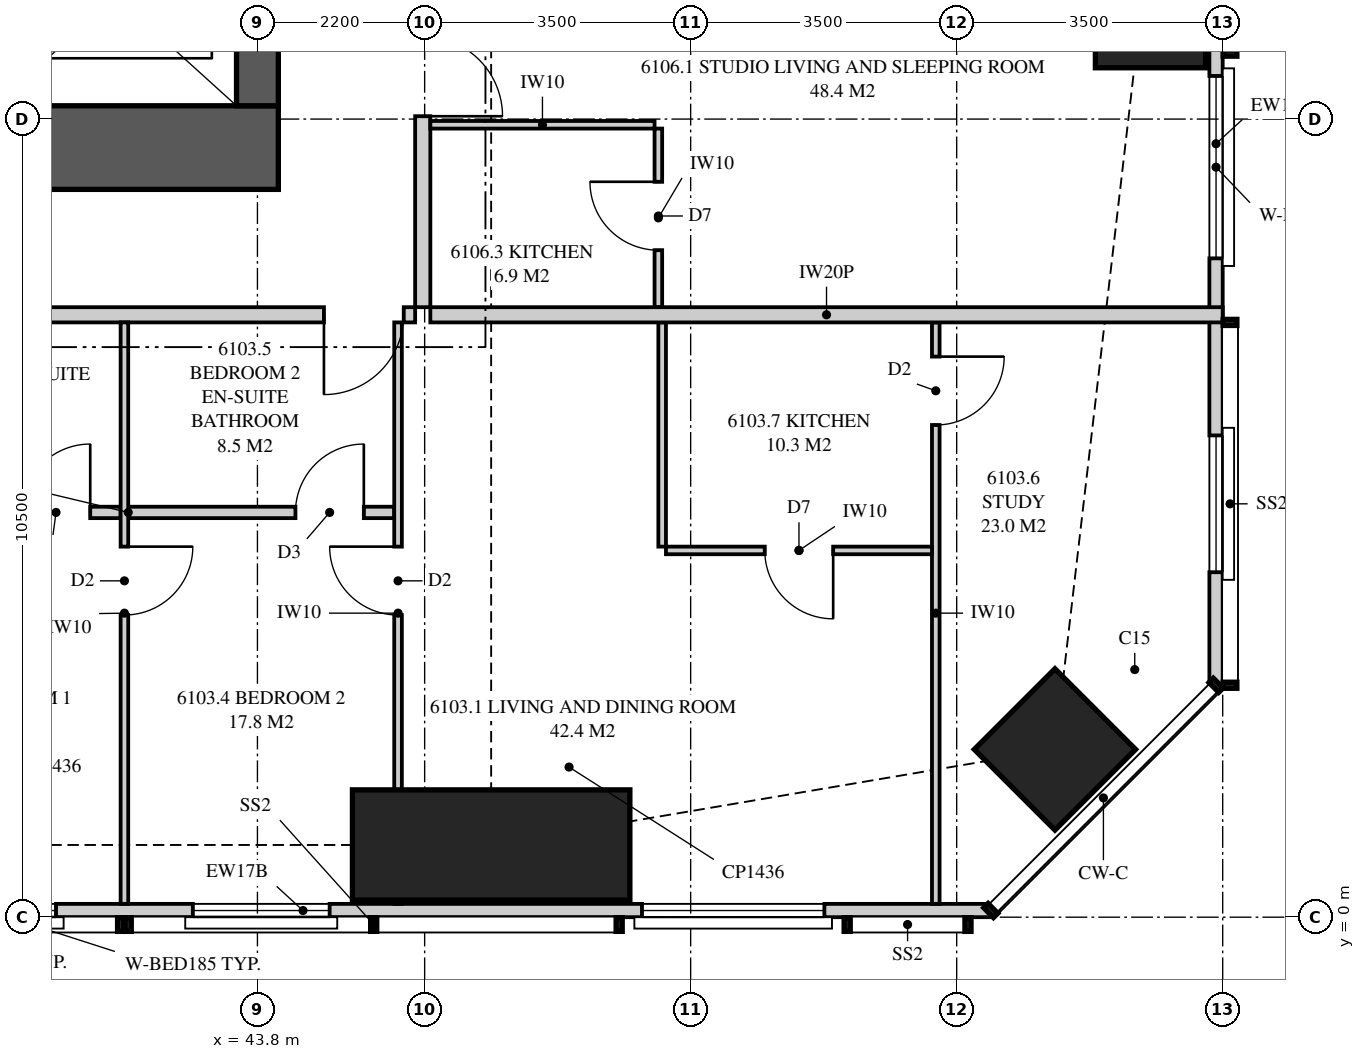
"""IFC4 building model, lengths in metres.
Left out: names, types, materials, properties, quantities, classifications, styles, units other than length and angle.
Written with IfcOpenShell. Run it as: python <this file> out.ifc"""

import sys

from ifc_helpers import new_model, si_unit, direction, frame, frame_2d, origin, origin_2d, place, context, subcontext, project, spatial, polyline, rectangle, outline, extrude, element, fill, save


model = new_model("IFC4")
c1 = context("Model", 3, precision=1e-05, world=origin(), true_north=direction((0.0, 1.0)))
c2 = subcontext(c1, "Body", "Model", "MODEL_VIEW")
j1 = project(units=[si_unit("LENGTHUNIT", "METRE"), si_unit("PLANEANGLEUNIT", "RADIAN")], contexts=[c1])
p1 = place(None, origin())
s1 = spatial("IfcSite", under=j1, at=p1, CompositionType="ELEMENT")
p2 = place(p1, origin())
s2 = spatial("IfcBuilding", under=s1, at=p2, CompositionType="ELEMENT")
p3 = place(p2, frame((0.0, 0.0, 224.95)))
s3 = spatial("IfcBuildingStorey", under=s2, at=p3, CompositionType="ELEMENT", Elevation=224.95)
p4 = place(p3, frame((46.875, 0.95, 0.0), z_axis=(0.0, 0.0, 1.0), x_axis=(0.0, 1.0, 0.0)))
e1 = element("IfcColumn", 1, at=p4, inside=s3, PredefinedType="COLUMN", context=c2, shape_type="SweptSolid", body=[
    extrude(rectangle(XDim=1.45, YDim=3.65, at=origin_2d()), origin(), (0.0, 0.0, 1.0), 3.5),
])
p5 = place(p3, frame((54.293, 2.207, 0.0), z_axis=(0.0, 0.0, 1.0), x_axis=(0.707106781187, 0.707106781187, 0.0)))
e2 = element("IfcColumn", 2, at=p5, inside=s3, PredefinedType="COLUMN", context=c2, shape_type="SweptSolid", body=[
    extrude(rectangle(XDim=1.5, YDim=1.5, at=origin_2d()), origin(), (0.0, 0.0, 1.0), 3.5),
])
p6 = place(p3, frame((55.55, 13.0, 0.0), z_axis=(0.0, 0.0, 1.0), x_axis=(1.0, 0.0, 0.0)))
e3 = element("IfcColumn", 3, at=p6, inside=s3, PredefinedType="COLUMN", context=c2, shape_type="SweptSolid", body=[
    extrude(rectangle(XDim=1.45, YDim=3.65, at=origin_2d()), origin(), (0.0, 0.0, 1.0), 3.5),
])
p7 = place(p3, frame((35.9, 10.125, 0.0), z_axis=(0.0, 0.0, 1.0), x_axis=(1.0, 0.0, 0.0)))
e4 = element("IfcWall", 4, at=p7, inside=s3, PredefinedType="SHEAR", context=c2, shape_type="SweptSolid", body=[
    extrude(rectangle(XDim=8.175, YDim=1.1, at=frame_2d((4.087, 0.0))), origin(), (0.0, 0.0, 1.0), 3.5),
])
p8 = place(p7, frame((2.7, 0.0, 0.0)))
e5 = element("IfcOpeningElement", 5, at=p8, cuts=e4, PredefinedType="OPENING", context=c2, shape_type="SweptSolid", body=[
    extrude(rectangle(XDim=1.0, YDim=2.1, at=frame_2d((0.5, 1.05))), frame((0.0, 0.56, 0.0), z_axis=(0.0, -1.0, 0.0), x_axis=(1.0, 0.0, 0.0)), (0.0, 0.0, 1.0), 1.12),
])
p9 = place(p3, frame((43.8, 10.675, 0.0), z_axis=(0.0, 0.0, 1.0), x_axis=(0.0, 1.0, 0.0)))
e6 = element("IfcWall", 6, at=p9, inside=s3, PredefinedType="SHEAR", context=c2, shape_type="SweptSolid", body=[
    extrude(rectangle(XDim=2.325, YDim=0.55, at=frame_2d((1.163, 0.0))), origin(), (0.0, 0.0, 1.0), 3.5),
])
p10 = place(p3, frame((35.35, 0.087, 0.0), z_axis=(0.0, 0.0, 1.0), x_axis=(1.0, 0.0, 0.0)))
e7 = element("IfcWall", 7, at=p10, inside=s3, PredefinedType="SOLIDWALL", context=c2, shape_type="SweptSolid", body=[
    extrude(outline(polyline([(0.0, 0.0), (18.099, 0.0), (18.099, 3.26), (11.74, 3.26), (11.74, 2.3), (11.656, 2.3), (11.656, 3.26), (11.525, 3.26), (11.525, 2.3), (0.0, 2.3), (0.0, 0.0)])), frame((0.0, 0.087, 0.0), z_axis=(0.0, -1.0, 0.0), x_axis=(1.0, 0.0, 0.0)), (0.0, 0.0, 1.0), 0.175),
])
p11 = place(p10, frame((4.0, 0.0, 0.4)))
e8 = element("IfcOpeningElement", 8, at=p11, cuts=e7, PredefinedType="OPENING", context=c2, shape_type="SweptSolid", body=[
    extrude(rectangle(XDim=1.8, YDim=1.85, at=frame_2d((0.9, 0.925))), frame((0.0, 0.097, 0.0), z_axis=(0.0, -1.0, 0.0), x_axis=(1.0, 0.0, 0.0)), (0.0, 0.0, 1.0), 0.195),
])
p12 = place(p10, frame((7.6, 0.0, 0.4)))
e9 = element("IfcOpeningElement", 9, at=p12, cuts=e7, PredefinedType="OPENING", context=c2, shape_type="SweptSolid", body=[
    extrude(rectangle(XDim=1.8, YDim=1.85, at=frame_2d((0.9, 0.925))), frame((0.0, 0.097, 0.0), z_axis=(0.0, -1.0, 0.0), x_axis=(1.0, 0.0, 0.0)), (0.0, 0.0, 1.0), 0.195),
])
p13 = place(p10, frame((13.51, 0.0, 0.4)))
e10 = element("IfcOpeningElement", 10, at=p13, cuts=e7, PredefinedType="OPENING", context=c2, shape_type="SweptSolid", body=[
    extrude(rectangle(XDim=2.4, YDim=1.85, at=frame_2d((1.2, 0.925))), frame((0.0, 0.097, 0.0), z_axis=(0.0, -1.0, 0.0), x_axis=(1.0, 0.0, 0.0)), (0.0, 0.0, 1.0), 0.195),
])
p14 = place(p3, frame((56.413, 3.051, 0.0), z_axis=(0.0, 0.0, 1.0), x_axis=(0.0, 1.0, 0.0)))
e11 = element("IfcWall", 11, at=p14, inside=s3, PredefinedType="SOLIDWALL", context=c2, shape_type="SweptSolid", body=[
    extrude(outline(polyline([(0.0, 0.0), (14.249, 0.0), (14.249, 2.3), (9.949, 2.3), (9.949, 3.26), (9.858, 3.26), (9.858, 2.3), (9.688, 2.3), (9.688, 3.26), (0.0, 3.26), (0.0, 0.0)])), frame((0.0, 0.087, 0.0), z_axis=(0.0, -1.0, 0.0), x_axis=(1.0, 0.0, 0.0)), (0.0, 0.0, 1.0), 0.175),
])
p15 = place(p14, frame((1.487, 0.0, 0.4)))
e12 = element("IfcOpeningElement", 12, at=p15, cuts=e11, PredefinedType="OPENING", context=c2, shape_type="SweptSolid", body=[
    extrude(rectangle(XDim=1.8, YDim=1.85, at=frame_2d((0.9, 0.925))), frame((0.0, 0.097, 0.0), z_axis=(0.0, -1.0, 0.0), x_axis=(1.0, 0.0, 0.0)), (0.0, 0.0, 1.0), 0.195),
])
p16 = place(p14, frame((5.616, 0.0, 0.4)))
e13 = element("IfcOpeningElement", 13, at=p16, cuts=e11, PredefinedType="OPENING", context=c2, shape_type="SweptSolid", body=[
    extrude(rectangle(XDim=2.4, YDim=1.85, at=frame_2d((1.2, 0.925))), frame((0.0, 0.097, 0.0), z_axis=(0.0, -1.0, 0.0), x_axis=(1.0, 0.0, 0.0)), (0.0, 0.0, 1.0), 0.195),
])
p17 = place(p14, frame((11.875, 0.0, 0.4)))
e14 = element("IfcOpeningElement", 14, at=p17, cuts=e11, PredefinedType="OPENING", context=c2, shape_type="SweptSolid", body=[
    extrude(rectangle(XDim=1.8, YDim=1.85, at=frame_2d((0.9, 0.925))), frame((0.0, 0.097, 0.0), z_axis=(0.0, -1.0, 0.0), x_axis=(1.0, 0.0, 0.0)), (0.0, 0.0, 1.0), 0.195),
])
p18 = place(p3, frame((38.55, 7.925, 0.0), z_axis=(0.0, 0.0, 1.0), x_axis=(1.0, 0.0, 0.0)))
e15 = element("IfcWall", 15, at=p18, inside=s3, PredefinedType="PARTITIONING", context=c2, shape_type="SweptSolid", body=[
    extrude(outline(polyline([(0.0, 0.0), (7.325, 0.0), (7.325, 3.26), (7.325, 2.66), (7.015, 2.66), (7.015, 3.26), (0.01, 3.26), (0.01, 2.66), (0.0, 2.66), (0.0, 3.26), (0.0, 0.0)])), frame((0.0, 0.1, 0.0), z_axis=(0.0, -1.0, 0.0), x_axis=(1.0, 0.0, 0.0)), (0.0, 0.0, 1.0), 0.2),
])
p19 = place(p18, frame((6.125, 0.0, 0.0)))
e16 = element("IfcOpeningElement", 16, at=p19, cuts=e15, PredefinedType="OPENING", context=c2, shape_type="SweptSolid", body=[
    extrude(rectangle(XDim=1.05, YDim=2.2, at=frame_2d((0.525, 1.1))), frame((0.0, 0.11, 0.0), z_axis=(0.0, -1.0, 0.0), x_axis=(1.0, 0.0, 0.0)), (0.0, 0.0, 1.0), 0.22),
])
p20 = place(p3, frame((42.05, 0.175, 0.0), z_axis=(0.0, 0.0, 1.0), x_axis=(0.0, 1.0, 0.0)))
e17 = element("IfcWall", 17, at=p20, inside=s3, PredefinedType="PARTITIONING", context=c2, shape_type="SweptSolid", body=[
    extrude(outline(polyline([(0.0, 0.0), (7.65, 0.0), (7.65, 3.26), (1.635, 3.26), (1.635, 2.3), (0.0, 2.3), (0.0, 3.26), (0.0, 0.0)])), frame((0.0, 0.05, 0.0), z_axis=(0.0, -1.0, 0.0), x_axis=(1.0, 0.0, 0.0)), (0.0, 0.0, 1.0), 0.1),
])
p21 = place(p20, frame((3.8, 0.0, 0.0)))
e18 = element("IfcOpeningElement", 18, at=p21, cuts=e17, PredefinedType="OPENING", context=c2, shape_type="SweptSolid", body=[
    extrude(rectangle(XDim=0.9, YDim=2.1, at=frame_2d((0.45, 1.05))), frame((0.0, 0.06, 0.0), z_axis=(0.0, -1.0, 0.0), x_axis=(1.0, 0.0, 0.0)), (0.0, 0.0, 1.0), 0.12),
])
p22 = place(p3, frame((45.65, 0.175, 0.0), z_axis=(0.0, 0.0, 1.0), x_axis=(0.0, 1.0, 0.0)))
e19 = element("IfcWall", 19, at=p22, inside=s3, PredefinedType="PARTITIONING", context=c2, shape_type="SweptSolid", body=[
    extrude(outline(polyline([(0.529, 2.3), (0.0, 2.3), (0.0, 0.0), (0.529, 0.0), (0.529, 0.252), (1.021, 0.252), (1.021, 0.0), (7.65, 0.0), (7.65, 2.66), (1.635, 2.66), (1.635, 2.3), (1.021, 2.3), (1.021, 2.048), (0.529, 2.048), (0.529, 2.3)])), frame((0.0, 0.05, 0.0), z_axis=(0.0, -1.0, 0.0), x_axis=(1.0, 0.0, 0.0)), (0.0, 0.0, 1.0), 0.1),
])
p23 = place(p22, frame((3.8, 0.0, 0.0)))
e20 = element("IfcOpeningElement", 20, at=p23, cuts=e19, PredefinedType="OPENING", context=c2, shape_type="SweptSolid", body=[
    extrude(rectangle(XDim=0.9, YDim=2.1, at=frame_2d((0.45, 1.05))), frame((0.0, 0.06, 0.0), z_axis=(0.0, -1.0, 0.0), x_axis=(1.0, 0.0, 0.0)), (0.0, 0.0, 1.0), 0.12),
])
p24 = place(p3, frame((38.55, 5.325, 0.0), z_axis=(0.0, 0.0, 1.0), x_axis=(1.0, 0.0, 0.0)))
e21 = element("IfcWall", 21, at=p24, inside=s3, PredefinedType="PLUMBINGWALL", context=c2, shape_type="SweptSolid", body=[
    extrude(rectangle(XDim=3.45, YDim=0.15, at=frame_2d((1.725, 0.0))), origin(), (0.0, 0.0, 1.0), 3.26),
])
p25 = place(p24, frame((2.15, 0.0, 0.0)))
e22 = element("IfcOpeningElement", 22, at=p25, cuts=e21, PredefinedType="OPENING", context=c2, shape_type="SweptSolid", body=[
    extrude(rectangle(XDim=0.9, YDim=2.1, at=frame_2d((0.45, 1.05))), frame((0.0, 0.085, 0.0), z_axis=(0.0, -1.0, 0.0), x_axis=(1.0, 0.0, 0.0)), (0.0, 0.0, 1.0), 0.17),
])
p26 = place(p3, frame((42.1, 5.325, 0.0), z_axis=(0.0, 0.0, 1.0), x_axis=(1.0, 0.0, 0.0)))
e23 = element("IfcWall", 23, at=p26, inside=s3, PredefinedType="PLUMBINGWALL", context=c2, shape_type="SweptSolid", body=[
    extrude(outline(polyline([(0.0, 0.0), (3.5, 0.0), (3.5, 3.26), (3.5, 2.66), (3.49, 2.66), (3.49, 3.26), (0.0, 3.26), (0.0, 0.0)])), frame((0.0, 0.075, 0.0), z_axis=(0.0, -1.0, 0.0), x_axis=(1.0, 0.0, 0.0)), (0.0, 0.0, 1.0), 0.15),
])
p27 = place(p26, frame((2.2, 0.0, 0.0)))
e24 = element("IfcOpeningElement", 24, at=p27, cuts=e23, PredefinedType="OPENING", context=c2, shape_type="SweptSolid", body=[
    extrude(rectangle(XDim=0.9, YDim=2.1, at=frame_2d((0.45, 1.05))), frame((0.0, 0.085, 0.0), z_axis=(0.0, -1.0, 0.0), x_axis=(1.0, 0.0, 0.0)), (0.0, 0.0, 1.0), 0.17),
])
p28 = place(p3, frame((52.725, 0.175, 0.0), z_axis=(0.0, 0.0, 1.0), x_axis=(0.0, 1.0, 0.0)))
e25 = element("IfcWall", 25, at=p28, inside=s3, PredefinedType="PARTITIONING", context=c2, shape_type="SweptSolid", body=[
    extrude(outline(polyline([(0.0, 0.0), (7.65, 0.0), (7.65, 3.26), (2.639, 3.26), (2.639, 2.3), (0.894, 2.3), (0.894, 3.26), (0.0, 3.26), (0.0, 0.0)])), frame((0.0, 0.05, 0.0), z_axis=(0.0, -1.0, 0.0), x_axis=(1.0, 0.0, 0.0)), (0.0, 0.0, 1.0), 0.1),
])
p29 = place(p28, frame((6.3, 0.0, 0.0)))
e26 = element("IfcOpeningElement", 26, at=p29, cuts=e25, PredefinedType="OPENING", context=c2, shape_type="SweptSolid", body=[
    extrude(rectangle(XDim=0.9, YDim=2.1, at=frame_2d((0.45, 1.05))), frame((0.0, 0.06, 0.0), z_axis=(0.0, -1.0, 0.0), x_axis=(1.0, 0.0, 0.0)), (0.0, 0.0, 1.0), 0.12),
])
p30 = place(p3, frame((49.175, 4.825, 0.0), z_axis=(0.0, 0.0, 1.0), x_axis=(1.0, 0.0, 0.0)))
e27 = element("IfcWall", 27, at=p30, inside=s3, PredefinedType="PARTITIONING", context=c2, shape_type="SweptSolid", body=[
    extrude(rectangle(XDim=3.5, YDim=0.1, at=frame_2d((1.75, 0.0))), origin(), (0.0, 0.0, 1.0), 3.26),
])
p31 = place(p30, frame((1.3, 0.0, 0.0)))
e28 = element("IfcOpeningElement", 28, at=p31, cuts=e27, PredefinedType="OPENING", context=c2, shape_type="SweptSolid", body=[
    extrude(rectangle(XDim=0.9, YDim=2.1, at=frame_2d((0.45, 1.05))), frame((0.0, 0.06, 0.0), z_axis=(0.0, -1.0, 0.0), x_axis=(1.0, 0.0, 0.0)), (0.0, 0.0, 1.0), 0.12),
])
p32 = place(p3, frame((49.125, 4.875, 0.0), z_axis=(0.0, 0.0, 1.0), x_axis=(0.0, 1.0, 0.0)))
e29 = element("IfcWall", 29, at=p32, inside=s3, PredefinedType="PARTITIONING", context=c2, shape_type="SweptSolid", body=[
    extrude(rectangle(XDim=2.95, YDim=0.1, at=frame_2d((1.475, 0.0))), origin(), (0.0, 0.0, 1.0), 3.26),
])
p33 = place(p3, frame((46.075, 7.925, 0.0), z_axis=(0.0, 0.0, 1.0), x_axis=(1.0, 0.0, 0.0)))
e30 = element("IfcWall", 30, at=p33, inside=s3, PredefinedType="PARTITIONING", context=c2, shape_type="SweptSolid", body=[
    extrude(outline(polyline([(0.0, 0.0), (10.425, 0.0), (10.425, 3.26), (9.8, 3.26), (9.8, 2.3), (7.968, 2.3), (7.968, 3.26), (2.11, 3.26), (2.11, 2.66), (0.0, 2.66), (0.0, 3.26), (0.0, 0.0)])), frame((0.0, 0.1, 0.0), z_axis=(0.0, -1.0, 0.0), x_axis=(1.0, 0.0, 0.0)), (0.0, 0.0, 1.0), 0.2),
])
p34 = place(p3, frame((45.975, 8.025, 0.0), z_axis=(0.0, 0.0, 1.0), x_axis=(0.0, 1.0, 0.0)))
e31 = element("IfcWall", 31, at=p34, inside=s3, PredefinedType="PARTITIONING", context=c2, shape_type="SweptSolid", body=[
    extrude(outline(polyline([(0.0, 0.0), (6.025, 0.0), (6.025, 3.26), (6.025, 2.66), (5.085, 2.66), (0.0, 2.66), (0.0, 3.26), (0.0, 0.0)])), frame((0.0, 0.1, 0.0), z_axis=(0.0, -1.0, 0.0), x_axis=(1.0, 0.0, 0.0)), (0.0, 0.0, 1.0), 0.2),
])
p35 = place(p34, frame((2.512, 0.0, 0.0)))
e32 = element("IfcOpeningElement", 32, at=p35, cuts=e31, PredefinedType="OPENING", context=c2, shape_type="SweptSolid", body=[
    extrude(rectangle(XDim=1.05, YDim=2.2, at=frame_2d((0.525, 1.1))), frame((0.0, 0.11, 0.0), z_axis=(0.0, -1.0, 0.0), x_axis=(1.0, 0.0, 0.0)), (0.0, 0.0, 1.0), 0.22),
])
p36 = place(p3, frame((49.075, 8.025, 0.0), z_axis=(0.0, 0.0, 1.0), x_axis=(0.0, 1.0, 0.0)))
e33 = element("IfcWall", 33, at=p36, inside=s3, PredefinedType="PARTITIONING", context=c2, shape_type="SweptSolid", body=[
    extrude(rectangle(XDim=2.35, YDim=0.1, at=frame_2d((1.175, 0.0))), origin(), (0.0, 0.0, 1.0), 3.26),
])
p37 = place(p36, frame((0.75, 0.0, 0.0)))
e34 = element("IfcOpeningElement", 34, at=p37, cuts=e33, PredefinedType="OPENING", context=c2, shape_type="SweptSolid", body=[
    extrude(rectangle(XDim=0.9, YDim=2.1, at=frame_2d((0.45, 1.05))), frame((0.0, 0.06, 0.0), z_axis=(0.0, -1.0, 0.0), x_axis=(1.0, 0.0, 0.0)), (0.0, 0.0, 1.0), 0.12),
])
p38 = place(p3, frame((49.025, 10.425, 0.0), z_axis=(0.0, 0.0, 1.0), x_axis=(-1.0, 0.0, 0.0)))
e35 = element("IfcWall", 35, at=p38, inside=s3, PredefinedType="PARTITIONING", context=c2, shape_type="SweptSolid", body=[
    extrude(outline(polyline([(0.0, 0.0), (2.95, 0.0), (2.95, 3.26), (2.95, 2.66), (0.89, 2.66), (0.89, 3.26), (0.0, 3.26), (0.0, 0.0)])), frame((0.0, 0.05, 0.0), z_axis=(0.0, -1.0, 0.0), x_axis=(1.0, 0.0, 0.0)), (0.0, 0.0, 1.0), 0.1),
])
p39 = place(p11, origin())
e36 = element("IfcWindow", 36, at=p39, inside=s3, PartitioningType="SINGLE_PANEL", PredefinedType="WINDOW", context=c2, shape_type="SweptSolid", body=[
    extrude(rectangle(XDim=1.8, YDim=1.85, at=frame_2d((0.9, 0.925))), frame((0.0, 0.03, 0.0), z_axis=(0.0, -1.0, 0.0), x_axis=(1.0, 0.0, 0.0)), (0.0, 0.0, 1.0), 0.06),
])
fill(e8, e36)
p40 = place(p12, origin())
e37 = element("IfcWindow", 37, at=p40, inside=s3, PartitioningType="SINGLE_PANEL", PredefinedType="WINDOW", context=c2, shape_type="SweptSolid", body=[
    extrude(rectangle(XDim=1.8, YDim=1.85, at=frame_2d((0.9, 0.925))), frame((0.0, 0.03, 0.0), z_axis=(0.0, -1.0, 0.0), x_axis=(1.0, 0.0, 0.0)), (0.0, 0.0, 1.0), 0.06),
])
fill(e9, e37)
p41 = place(p13, origin())
e38 = element("IfcWindow", 38, at=p41, inside=s3, PartitioningType="SINGLE_PANEL", PredefinedType="WINDOW", context=c2, shape_type="SweptSolid", body=[
    extrude(rectangle(XDim=2.4, YDim=1.85, at=frame_2d((1.2, 0.925))), frame((0.0, 0.03, 0.0), z_axis=(0.0, -1.0, 0.0), x_axis=(1.0, 0.0, 0.0)), (0.0, 0.0, 1.0), 0.06),
])
fill(e10, e38)
p42 = place(p15, origin())
e39 = element("IfcWindow", 39, at=p42, inside=s3, PartitioningType="SINGLE_PANEL", PredefinedType="WINDOW", context=c2, shape_type="SweptSolid", body=[
    extrude(rectangle(XDim=1.8, YDim=1.85, at=frame_2d((0.9, 0.925))), frame((0.0, 0.03, 0.0), z_axis=(0.0, -1.0, 0.0), x_axis=(1.0, 0.0, 0.0)), (0.0, 0.0, 1.0), 0.06),
])
fill(e12, e39)
p43 = place(p16, origin())
e40 = element("IfcWindow", 40, at=p43, inside=s3, PartitioningType="SINGLE_PANEL", PredefinedType="WINDOW", context=c2, shape_type="SweptSolid", body=[
    extrude(rectangle(XDim=2.4, YDim=1.85, at=frame_2d((1.2, 0.925))), frame((0.0, 0.03, 0.0), z_axis=(0.0, -1.0, 0.0), x_axis=(1.0, 0.0, 0.0)), (0.0, 0.0, 1.0), 0.06),
])
fill(e13, e40)
p44 = place(p19, frame((1.05, 0.0, 0.0), z_axis=(0.0, 0.0, 1.0), x_axis=(-1.0, 0.0, 0.0)))
e41 = element("IfcDoor", 41, at=p44, inside=s3, OperationType="SINGLE_SWING_RIGHT", PredefinedType="DOOR", context=c2, shape_type="SweptSolid", body=[
    extrude(rectangle(XDim=1.05, YDim=2.2, at=frame_2d((0.525, 1.1))), frame((0.0, 0.025, 0.0), z_axis=(0.0, -1.0, 0.0), x_axis=(1.0, 0.0, 0.0)), (0.0, 0.0, 1.0), 0.05),
])
fill(e16, e41)
p45 = place(p21, frame((0.9, 0.0, 0.0), z_axis=(0.0, 0.0, 1.0), x_axis=(-1.0, 0.0, 0.0)))
e42 = element("IfcDoor", 42, at=p45, inside=s3, OperationType="SINGLE_SWING_LEFT", PredefinedType="DOOR", context=c2, shape_type="SweptSolid", body=[
    extrude(rectangle(XDim=0.9, YDim=2.1, at=frame_2d((0.45, 1.05))), frame((0.0, 0.025, 0.0), z_axis=(0.0, -1.0, 0.0), x_axis=(1.0, 0.0, 0.0)), (0.0, 0.0, 1.0), 0.05),
])
fill(e18, e42)
p46 = place(p25, origin())
e43 = element("IfcDoor", 43, at=p46, inside=s3, OperationType="SINGLE_SWING_RIGHT", PredefinedType="DOOR", context=c2, shape_type="SweptSolid", body=[
    extrude(rectangle(XDim=0.9, YDim=2.1, at=frame_2d((0.45, 1.05))), frame((0.0, 0.025, 0.0), z_axis=(0.0, -1.0, 0.0), x_axis=(1.0, 0.0, 0.0)), (0.0, 0.0, 1.0), 0.05),
])
fill(e22, e43)
p47 = place(p23, origin())
e44 = element("IfcDoor", 44, at=p47, inside=s3, OperationType="SINGLE_SWING_RIGHT", PredefinedType="DOOR", context=c2, shape_type="SweptSolid", body=[
    extrude(rectangle(XDim=0.9, YDim=2.1, at=frame_2d((0.45, 1.05))), frame((0.0, 0.025, 0.0), z_axis=(0.0, -1.0, 0.0), x_axis=(1.0, 0.0, 0.0)), (0.0, 0.0, 1.0), 0.05),
])
fill(e20, e44)
p48 = place(p27, origin())
e45 = element("IfcDoor", 45, at=p48, inside=s3, OperationType="SINGLE_SWING_RIGHT", PredefinedType="DOOR", context=c2, shape_type="SweptSolid", body=[
    extrude(rectangle(XDim=0.9, YDim=2.1, at=frame_2d((0.45, 1.05))), frame((0.0, 0.025, 0.0), z_axis=(0.0, -1.0, 0.0), x_axis=(1.0, 0.0, 0.0)), (0.0, 0.0, 1.0), 0.05),
])
fill(e24, e45)
p49 = place(p29, frame((0.9, 0.0, 0.0), z_axis=(0.0, 0.0, 1.0), x_axis=(-1.0, 0.0, 0.0)))
e46 = element("IfcDoor", 46, at=p49, inside=s3, OperationType="SINGLE_SWING_LEFT", PredefinedType="DOOR", context=c2, shape_type="SweptSolid", body=[
    extrude(rectangle(XDim=0.9, YDim=2.1, at=frame_2d((0.45, 1.05))), frame((0.0, 0.025, 0.0), z_axis=(0.0, -1.0, 0.0), x_axis=(1.0, 0.0, 0.0)), (0.0, 0.0, 1.0), 0.05),
])
fill(e26, e46)
p50 = place(p31, frame((0.9, 0.0, 0.0), z_axis=(0.0, 0.0, 1.0), x_axis=(-1.0, 0.0, 0.0)))
e47 = element("IfcDoor", 47, at=p50, inside=s3, OperationType="SINGLE_SWING_LEFT", PredefinedType="DOOR", context=c2, shape_type="SweptSolid", body=[
    extrude(rectangle(XDim=0.9, YDim=2.1, at=frame_2d((0.45, 1.05))), frame((0.0, 0.025, 0.0), z_axis=(0.0, -1.0, 0.0), x_axis=(1.0, 0.0, 0.0)), (0.0, 0.0, 1.0), 0.05),
])
fill(e28, e47)
p51 = place(p35, frame((1.05, 0.0, 0.0), z_axis=(0.0, 0.0, 1.0), x_axis=(-1.0, 0.0, 0.0)))
e48 = element("IfcDoor", 48, at=p51, inside=s3, OperationType="SINGLE_SWING_RIGHT", PredefinedType="DOOR", context=c2, shape_type="SweptSolid", body=[
    extrude(rectangle(XDim=1.05, YDim=2.2, at=frame_2d((0.525, 1.1))), frame((0.0, 0.025, 0.0), z_axis=(0.0, -1.0, 0.0), x_axis=(1.0, 0.0, 0.0)), (0.0, 0.0, 1.0), 0.05),
])
fill(e32, e48)
p52 = place(p37, origin())
e49 = element("IfcDoor", 49, at=p52, inside=s3, OperationType="SINGLE_SWING_RIGHT", PredefinedType="DOOR", context=c2, shape_type="SweptSolid", body=[
    extrude(rectangle(XDim=0.9, YDim=2.1, at=frame_2d((0.45, 1.05))), frame((0.0, 0.025, 0.0), z_axis=(0.0, -1.0, 0.0), x_axis=(1.0, 0.0, 0.0)), (0.0, 0.0, 1.0), 0.05),
])
fill(e34, e49)
save(model, sys.argv[1])
